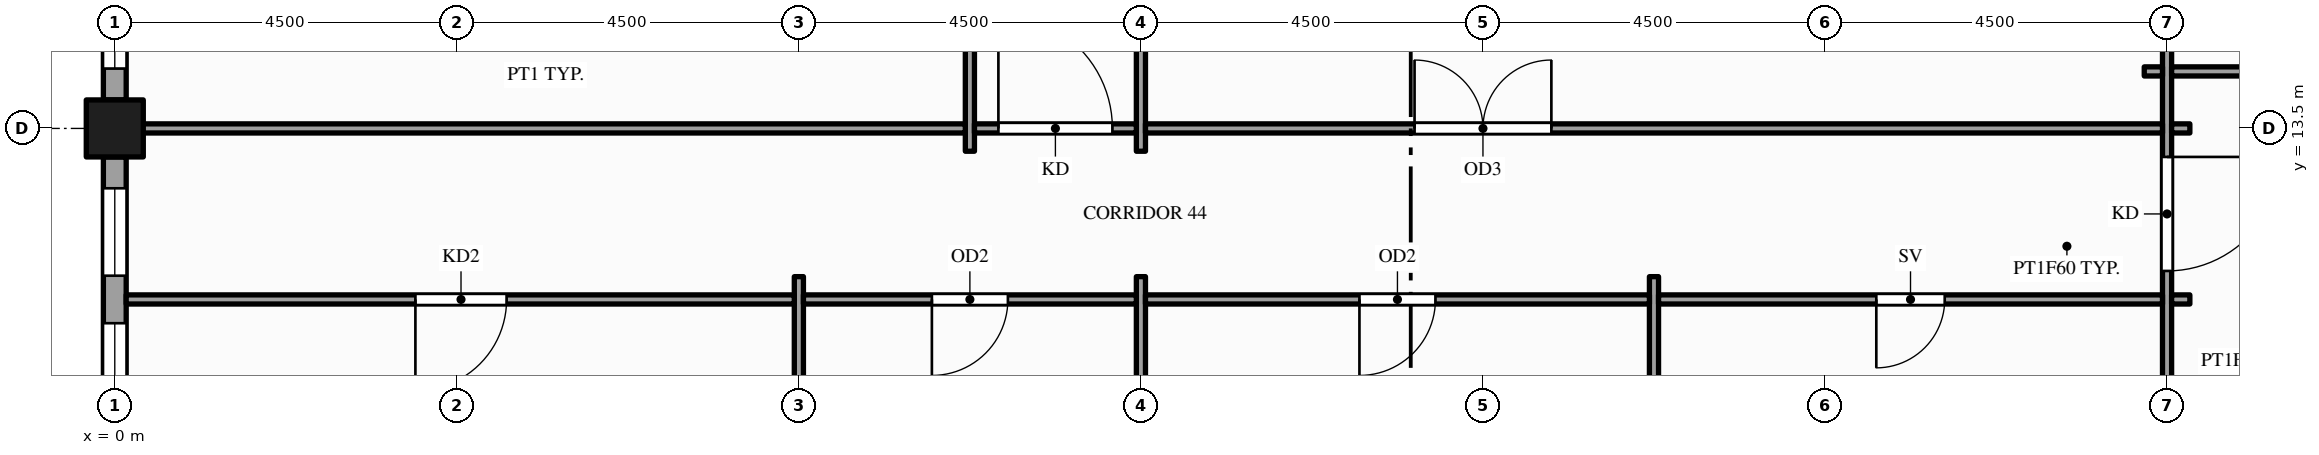
"""IFC4 building model, lengths in metres.
Left out: names, types, materials, properties, quantities, classifications, styles, units other than length and angle.
Written with IfcOpenShell. Run it as: python <this file> out.ifc"""

import sys

from ifc_helpers import new_model, si_unit, direction, frame, frame_2d, origin, origin_2d, place, context, subcontext, project, spatial, rectangle, hollow_rectangle, extrude, element, fill, save


model = new_model("IFC4")
c1 = context("Model", 3, precision=1e-05, world=origin(), true_north=direction((0.0, 1.0)))
c2 = subcontext(c1, "Body", "Model", "MODEL_VIEW")
j1 = project(units=[si_unit("LENGTHUNIT", "METRE"), si_unit("PLANEANGLEUNIT", "RADIAN")], contexts=[c1])
p1 = place(None, origin())
s1 = spatial("IfcSite", under=j1, at=p1, CompositionType="ELEMENT")
p2 = place(p1, origin())
s2 = spatial("IfcBuilding", under=s1, at=p2, CompositionType="ELEMENT")
p3 = place(p2, frame((0.0, 0.0, 207.0)))
s3 = spatial("IfcBuildingStorey", under=s2, at=p3, CompositionType="ELEMENT", Elevation=207.0)
p4 = place(p3, frame((0.0, 13.5, -0.15), z_axis=(0.0, 0.0, 1.0), x_axis=(1.0, 0.0, 0.0)))
e1 = element("IfcColumn", 1, at=p4, inside=s3, PredefinedType="COLUMN", context=c2, shape_type="SweptSolid", body=[
    extrude(hollow_rectangle(XDim=0.75, YDim=0.75, WallThickness=0.036, at=origin_2d()), origin(), (0.0, 0.0, 1.0), 4.0),
])
p5 = place(p3, frame((0.0, 17.625, 0.0), z_axis=(0.0, 0.0, 1.0), x_axis=(0.0, -1.0, 0.0)))
e2 = element("IfcWall", 2, at=p5, inside=s3, PredefinedType="STANDARD", context=c2, shape_type="SweptSolid", body=[
    extrude(rectangle(XDim=3.75, YDim=0.3, at=frame_2d((1.875, 0.0))), origin(), (0.0, 0.0, 1.0), 3.157),
])
p6 = place(p5, frame((0.413, 0.0, 0.9)))
e3 = element("IfcOpeningElement", 3, at=p6, cuts=e2, PredefinedType="OPENING", context=c2, shape_type="SweptSolid", body=[
    extrude(rectangle(XDim=1.15, YDim=2.0, at=frame_2d((0.575, 1.0))), frame((0.0, 0.16, 0.0), z_axis=(0.0, -1.0, 0.0), x_axis=(1.0, 0.0, 0.0)), (0.0, 0.0, 1.0), 0.32),
])
p7 = place(p5, frame((2.188, 0.0, 0.9)))
e4 = element("IfcOpeningElement", 4, at=p7, cuts=e2, PredefinedType="OPENING", context=c2, shape_type="SweptSolid", body=[
    extrude(rectangle(XDim=1.15, YDim=2.0, at=frame_2d((0.575, 1.0))), frame((0.0, 0.16, 0.0), z_axis=(0.0, -1.0, 0.0), x_axis=(1.0, 0.0, 0.0)), (0.0, 0.0, 1.0), 0.32),
])
p8 = place(p3, frame((0.0, 13.125, 0.0), z_axis=(0.0, 0.0, 1.0), x_axis=(0.0, -1.0, 0.0)))
e5 = element("IfcWall", 5, at=p8, inside=s3, PredefinedType="STANDARD", context=c2, shape_type="SweptSolid", body=[
    extrude(rectangle(XDim=3.75, YDim=0.3, at=frame_2d((1.875, 0.0))), origin(), (0.0, 0.0, 1.0), 3.157),
])
p9 = place(p8, frame((0.413, 0.0, 0.9)))
e6 = element("IfcOpeningElement", 6, at=p9, cuts=e5, PredefinedType="OPENING", context=c2, shape_type="SweptSolid", body=[
    extrude(rectangle(XDim=1.15, YDim=2.0, at=frame_2d((0.575, 1.0))), frame((0.0, 0.16, 0.0), z_axis=(0.0, -1.0, 0.0), x_axis=(1.0, 0.0, 0.0)), (0.0, 0.0, 1.0), 0.32),
])
p10 = place(p8, frame((2.188, 0.0, 0.9)))
e7 = element("IfcOpeningElement", 7, at=p10, cuts=e5, PredefinedType="OPENING", context=c2, shape_type="SweptSolid", body=[
    extrude(rectangle(XDim=1.15, YDim=2.0, at=frame_2d((0.575, 1.0))), frame((0.0, 0.16, 0.0), z_axis=(0.0, -1.0, 0.0), x_axis=(1.0, 0.0, 0.0)), (0.0, 0.0, 1.0), 0.32),
])
p11 = place(p3, frame((9.0, 3.875, 0.0), z_axis=(0.0, 0.0, 1.0), x_axis=(0.0, 1.0, 0.0)))
e8 = element("IfcWall", 8, at=p11, inside=s3, PredefinedType="PARTITIONING", context=c2, shape_type="SweptSolid", body=[
    extrude(rectangle(XDim=7.675, YDim=0.12, at=frame_2d((3.837, 0.0))), origin(), (0.0, 0.0, 1.0), 2.87),
])
p12 = place(p3, frame((11.25, 13.2, 0.0), z_axis=(0.0, 0.0, 1.0), x_axis=(0.0, 1.0, 0.0)))
e9 = element("IfcWall", 9, at=p12, inside=s3, PredefinedType="PARTITIONING", context=c2, shape_type="SweptSolid", body=[
    extrude(rectangle(XDim=18.6, YDim=0.12, at=frame_2d((9.3, 0.0))), origin(), (0.0, 0.0, 1.0), 2.6),
])
p13 = place(p12, frame((3.175, 0.0, 0.0)))
e10 = element("IfcOpeningElement", 10, at=p13, cuts=e9, PredefinedType="OPENING", context=c2, shape_type="SweptSolid", body=[
    extrude(rectangle(XDim=1.0, YDim=2.1, at=frame_2d((0.5, 1.05))), frame((0.0, 0.07, 0.0), z_axis=(0.0, -1.0, 0.0), x_axis=(1.0, 0.0, 0.0)), (0.0, 0.0, 1.0), 0.14),
])
p14 = place(p12, frame((9.955, 0.0, 0.0)))
e11 = element("IfcOpeningElement", 11, at=p14, cuts=e9, PredefinedType="OPENING", context=c2, shape_type="SweptSolid", body=[
    extrude(rectangle(XDim=1.0, YDim=2.1, at=frame_2d((0.5, 1.05))), frame((0.0, 0.07, 0.0), z_axis=(0.0, -1.0, 0.0), x_axis=(1.0, 0.0, 0.0)), (0.0, 0.0, 1.0), 0.14),
])
p15 = place(p3, frame((13.5, 0.15, 0.0), z_axis=(0.0, 0.0, 1.0), x_axis=(0.0, 1.0, 0.0)))
e12 = element("IfcWall", 12, at=p15, inside=s3, PredefinedType="PARTITIONING", context=c2, shape_type="SweptSolid", body=[
    extrude(rectangle(XDim=11.4, YDim=0.12, at=frame_2d((5.7, 0.0))), origin(), (0.0, 0.0, 1.0), 2.87),
])
p16 = place(p3, frame((13.5, 13.2, 0.0), z_axis=(0.0, 0.0, 1.0), x_axis=(0.0, 1.0, 0.0)))
e13 = element("IfcWall", 13, at=p16, inside=s3, PredefinedType="PARTITIONING", context=c2, shape_type="SweptSolid", body=[
    extrude(rectangle(XDim=18.6, YDim=0.12, at=frame_2d((9.3, 0.0))), origin(), (0.0, 0.0, 1.0), 2.6),
])
p17 = place(p16, frame((4.2, 0.0, 0.0)))
e14 = element("IfcOpeningElement", 14, at=p17, cuts=e13, PredefinedType="OPENING", context=c2, shape_type="SweptSolid", body=[
    extrude(rectangle(XDim=1.2, YDim=2.1, at=frame_2d((0.6, 1.05))), frame((0.0, 0.07, 0.0), z_axis=(0.0, -1.0, 0.0), x_axis=(1.0, 0.0, 0.0)), (0.0, 0.0, 1.0), 0.14),
])
p18 = place(p3, frame((20.25, 0.15, 0.0), z_axis=(0.0, 0.0, 1.0), x_axis=(0.0, 1.0, 0.0)))
e15 = element("IfcWall", 15, at=p18, inside=s3, PredefinedType="PARTITIONING", context=c2, shape_type="SweptSolid", body=[
    extrude(rectangle(XDim=11.4, YDim=0.12, at=frame_2d((5.7, 0.0))), origin(), (0.0, 0.0, 1.0), 2.87),
])
p19 = place(p3, frame((27.0, -1.35, 0.0), z_axis=(0.0, 0.0, 1.0), x_axis=(0.0, 1.0, 0.0)))
e16 = element("IfcWall", 16, at=p19, inside=s3, PredefinedType="PARTITIONING", context=c2, shape_type="SweptSolid", body=[
    extrude(rectangle(XDim=22.48, YDim=0.12, at=frame_2d((11.24, 0.0))), origin(), (0.0, 0.0, 1.0), 2.87),
])
p20 = place(p19, frame((12.975, 0.0, 0.0)))
e17 = element("IfcOpeningElement", 17, at=p20, cuts=e16, PredefinedType="OPENING", context=c2, shape_type="SweptSolid", body=[
    extrude(rectangle(XDim=1.5, YDim=2.1, at=frame_2d((0.75, 1.05))), frame((0.0, 0.07, 0.0), z_axis=(0.0, -1.0, 0.0), x_axis=(1.0, 0.0, 0.0)), (0.0, 0.0, 1.0), 0.14),
])
p21 = place(p3, frame((0.15, 11.25, 0.0), z_axis=(0.0, 0.0, 1.0), x_axis=(1.0, 0.0, 0.0)))
e18 = element("IfcWall", 18, at=p21, inside=s3, PredefinedType="PARTITIONING", context=c2, shape_type="SweptSolid", body=[
    extrude(rectangle(XDim=8.79, YDim=0.12, at=frame_2d((4.395, 0.0))), origin(), (0.0, 0.0, 1.0), 2.87),
])
p22 = place(p21, frame((3.805, 0.0, 0.0)))
e19 = element("IfcOpeningElement", 19, at=p22, cuts=e18, PredefinedType="OPENING", context=c2, shape_type="SweptSolid", body=[
    extrude(rectangle(XDim=1.2, YDim=2.1, at=frame_2d((0.6, 1.05))), frame((0.0, 0.07, 0.0), z_axis=(0.0, -1.0, 0.0), x_axis=(1.0, 0.0, 0.0)), (0.0, 0.0, 1.0), 0.14),
])
p23 = place(p3, frame((9.06, 11.25, 0.0), z_axis=(0.0, 0.0, 1.0), x_axis=(1.0, 0.0, 0.0)))
e20 = element("IfcWall", 20, at=p23, inside=s3, PredefinedType="PARTITIONING", context=c2, shape_type="SweptSolid", body=[
    extrude(rectangle(XDim=4.38, YDim=0.12, at=frame_2d((2.19, 0.0))), origin(), (0.0, 0.0, 1.0), 2.87),
])
p24 = place(p23, frame((1.69, 0.0, 0.0)))
e21 = element("IfcOpeningElement", 21, at=p24, cuts=e20, PredefinedType="OPENING", context=c2, shape_type="SweptSolid", body=[
    extrude(rectangle(XDim=1.0, YDim=2.1, at=frame_2d((0.5, 1.05))), frame((0.0, 0.07, 0.0), z_axis=(0.0, -1.0, 0.0), x_axis=(1.0, 0.0, 0.0)), (0.0, 0.0, 1.0), 0.14),
])
p25 = place(p3, frame((13.56, 11.25, 0.0), z_axis=(0.0, 0.0, 1.0), x_axis=(1.0, 0.0, 0.0)))
e22 = element("IfcWall", 22, at=p25, inside=s3, PredefinedType="PARTITIONING", context=c2, shape_type="SweptSolid", body=[
    extrude(rectangle(XDim=6.63, YDim=0.12, at=frame_2d((3.315, 0.0))), origin(), (0.0, 0.0, 1.0), 2.87),
])
p26 = place(p25, frame((2.815, 0.0, 0.0)))
e23 = element("IfcOpeningElement", 23, at=p26, cuts=e22, PredefinedType="OPENING", context=c2, shape_type="SweptSolid", body=[
    extrude(rectangle(XDim=1.0, YDim=2.1, at=frame_2d((0.5, 1.05))), frame((0.0, 0.07, 0.0), z_axis=(0.0, -1.0, 0.0), x_axis=(1.0, 0.0, 0.0)), (0.0, 0.0, 1.0), 0.14),
])
p27 = place(p3, frame((20.31, 11.25, 0.0), z_axis=(0.0, 0.0, 1.0), x_axis=(1.0, 0.0, 0.0)))
e24 = element("IfcWall", 24, at=p27, inside=s3, PredefinedType="PARTITIONING", context=c2, shape_type="SweptSolid", body=[
    extrude(rectangle(XDim=6.63, YDim=0.12, at=frame_2d((3.315, 0.0))), origin(), (0.0, 0.0, 1.0), 2.76),
])
p28 = place(p27, frame((2.865, 0.0, 0.0)))
e25 = element("IfcOpeningElement", 25, at=p28, cuts=e24, PredefinedType="OPENING", context=c2, shape_type="SweptSolid", body=[
    extrude(rectangle(XDim=0.9, YDim=2.1, at=frame_2d((0.45, 1.05))), frame((0.0, 0.07, 0.0), z_axis=(0.0, -1.0, 0.0), x_axis=(1.0, 0.0, 0.0)), (0.0, 0.0, 1.0), 0.14),
])
p29 = place(p3, frame((27.06, 11.25, 0.0), z_axis=(0.0, 0.0, 1.0), x_axis=(1.0, 0.0, 0.0)))
e26 = element("IfcWall", 26, at=p29, inside=s3, PredefinedType="PARTITIONING", context=c2, shape_type="SweptSolid", body=[
    extrude(rectangle(XDim=0.24, YDim=0.12, at=frame_2d((0.12, 0.0))), origin(), (0.0, 0.0, 1.0), 2.87),
])
p30 = place(p3, frame((0.15, 13.5, 0.0), z_axis=(0.0, 0.0, 1.0), x_axis=(1.0, 0.0, 0.0)))
e27 = element("IfcWall", 27, at=p30, inside=s3, PredefinedType="PARTITIONING", context=c2, shape_type="SweptSolid", body=[
    extrude(rectangle(XDim=11.04, YDim=0.12, at=frame_2d((5.52, 0.0))), origin(), (0.0, 0.0, 1.0), 2.87),
])
p31 = place(p3, frame((11.31, 13.5, 0.0), z_axis=(0.0, 0.0, 1.0), x_axis=(1.0, 0.0, 0.0)))
e28 = element("IfcWall", 28, at=p31, inside=s3, PredefinedType="PARTITIONING", context=c2, shape_type="SweptSolid", body=[
    extrude(rectangle(XDim=2.13, YDim=0.12, at=frame_2d((1.065, 0.0))), origin(), (0.0, 0.0, 1.0), 2.87),
])
p32 = place(p31, frame((0.315, 0.0, 0.0)))
e29 = element("IfcOpeningElement", 29, at=p32, cuts=e28, PredefinedType="OPENING", context=c2, shape_type="SweptSolid", body=[
    extrude(rectangle(XDim=1.5, YDim=2.1, at=frame_2d((0.75, 1.05))), frame((0.0, 0.07, 0.0), z_axis=(0.0, -1.0, 0.0), x_axis=(1.0, 0.0, 0.0)), (0.0, 0.0, 1.0), 0.14),
])
p33 = place(p3, frame((13.56, 13.5, 0.0), z_axis=(0.0, 0.0, 1.0), x_axis=(1.0, 0.0, 0.0)))
e30 = element("IfcWall", 30, at=p33, inside=s3, PredefinedType="PARTITIONING", context=c2, shape_type="SweptSolid", body=[
    extrude(rectangle(XDim=13.38, YDim=0.12, at=frame_2d((6.69, 0.0))), origin(), (0.0, 0.0, 1.0), 2.76),
])
p34 = place(p33, frame((3.54, 0.0, 0.0)))
e31 = element("IfcOpeningElement", 31, at=p34, cuts=e30, PredefinedType="OPENING", context=c2, shape_type="SweptSolid", body=[
    extrude(rectangle(XDim=1.8, YDim=2.1, at=frame_2d((0.9, 1.05))), frame((0.0, 0.07, 0.0), z_axis=(0.0, -1.0, 0.0), x_axis=(1.0, 0.0, 0.0)), (0.0, 0.0, 1.0), 0.14),
])
for number, where, z_axis, x_axis in (
    (32, (27.06, 13.5, 0.0), (0.0, 0.0, 1.0), (1.0, 0.0, 0.0)),
    (33, (26.7, 14.25, 0.0), (0.0, 0.0, 1.0), (1.0, 0.0, 0.0)),
):
    element("IfcWall", number, at=place(p3, frame(where, z_axis=z_axis, x_axis=x_axis)), inside=s3, PredefinedType="PARTITIONING", context=c2, shape_type="SweptSolid", body=[
        extrude(rectangle(XDim=0.24, YDim=0.12, at=frame_2d((0.12, 0.0))), origin(), (0.0, 0.0, 1.0), 2.87),
    ])
p35 = place(p3, frame((27.06, 14.25, 0.0), z_axis=(0.0, 0.0, 1.0), x_axis=(1.0, 0.0, 0.0)))
e34 = element("IfcWall", 34, at=p35, inside=s3, PredefinedType="PARTITIONING", context=c2, shape_type="SweptSolid", body=[
    extrude(rectangle(XDim=2.13, YDim=0.12, at=frame_2d((1.065, 0.0))), origin(), (0.0, 0.0, 1.0), 2.87),
])
p36 = place(p7, origin())
e35 = element("IfcWindow", 35, at=p36, inside=s3, PartitioningType="SINGLE_PANEL", PredefinedType="WINDOW", context=c2, shape_type="SweptSolid", body=[
    extrude(rectangle(XDim=1.15, YDim=2.0, at=frame_2d((0.575, 1.0))), frame((0.0, 0.03, 0.0), z_axis=(0.0, -1.0, 0.0), x_axis=(1.0, 0.0, 0.0)), (0.0, 0.0, 1.0), 0.06),
])
fill(e4, e35)
p37 = place(p9, origin())
e36 = element("IfcWindow", 36, at=p37, inside=s3, PartitioningType="SINGLE_PANEL", PredefinedType="WINDOW", context=c2, shape_type="SweptSolid", body=[
    extrude(rectangle(XDim=1.15, YDim=2.0, at=frame_2d((0.575, 1.0))), frame((0.0, 0.03, 0.0), z_axis=(0.0, -1.0, 0.0), x_axis=(1.0, 0.0, 0.0)), (0.0, 0.0, 1.0), 0.06),
])
fill(e6, e36)
p38 = place(p10, origin())
e37 = element("IfcWindow", 37, at=p38, inside=s3, PartitioningType="SINGLE_PANEL", PredefinedType="WINDOW", context=c2, shape_type="SweptSolid", body=[
    extrude(rectangle(XDim=1.15, YDim=2.0, at=frame_2d((0.575, 1.0))), frame((0.0, 0.03, 0.0), z_axis=(0.0, -1.0, 0.0), x_axis=(1.0, 0.0, 0.0)), (0.0, 0.0, 1.0), 0.06),
])
fill(e7, e37)
p39 = place(p20, origin())
e38 = element("IfcDoor", 38, at=p39, inside=s3, OperationType="SINGLE_SWING_RIGHT", PredefinedType="DOOR", context=c2, shape_type="SweptSolid", body=[
    extrude(rectangle(XDim=1.5, YDim=2.1, at=frame_2d((0.75, 1.05))), frame((0.0, 0.025, 0.0), z_axis=(0.0, -1.0, 0.0), x_axis=(1.0, 0.0, 0.0)), (0.0, 0.0, 1.0), 0.05),
])
fill(e17, e38)
p40 = place(p22, origin())
e39 = element("IfcDoor", 39, at=p40, inside=s3, OperationType="SINGLE_SWING_LEFT", PredefinedType="DOOR", context=c2, shape_type="SweptSolid", body=[
    extrude(rectangle(XDim=1.2, YDim=2.1, at=frame_2d((0.6, 1.05))), frame((0.0, 0.025, 0.0), z_axis=(0.0, -1.0, 0.0), x_axis=(1.0, 0.0, 0.0)), (0.0, 0.0, 1.0), 0.05),
])
fill(e19, e39)
p41 = place(p24, origin())
e40 = element("IfcDoor", 40, at=p41, inside=s3, OperationType="SINGLE_SWING_LEFT", PredefinedType="DOOR", context=c2, shape_type="SweptSolid", body=[
    extrude(rectangle(XDim=1.0, YDim=2.1, at=frame_2d((0.5, 1.05))), frame((0.0, 0.025, 0.0), z_axis=(0.0, -1.0, 0.0), x_axis=(1.0, 0.0, 0.0)), (0.0, 0.0, 1.0), 0.05),
])
fill(e21, e40)
p42 = place(p26, origin())
e41 = element("IfcDoor", 41, at=p42, inside=s3, OperationType="SINGLE_SWING_LEFT", PredefinedType="DOOR", context=c2, shape_type="SweptSolid", body=[
    extrude(rectangle(XDim=1.0, YDim=2.1, at=frame_2d((0.5, 1.05))), frame((0.0, 0.025, 0.0), z_axis=(0.0, -1.0, 0.0), x_axis=(1.0, 0.0, 0.0)), (0.0, 0.0, 1.0), 0.05),
])
fill(e23, e41)
p43 = place(p28, origin())
e42 = element("IfcDoor", 42, at=p43, inside=s3, OperationType="SINGLE_SWING_LEFT", PredefinedType="DOOR", context=c2, shape_type="SweptSolid", body=[
    extrude(rectangle(XDim=0.9, YDim=2.1, at=frame_2d((0.45, 1.05))), frame((0.0, 0.025, 0.0), z_axis=(0.0, -1.0, 0.0), x_axis=(1.0, 0.0, 0.0)), (0.0, 0.0, 1.0), 0.05),
])
fill(e25, e42)
p44 = place(p34, origin())
e43 = element("IfcDoor", 43, at=p44, inside=s3, OperationType="DOUBLE_DOOR_SINGLE_SWING", PredefinedType="DOOR", context=c2, shape_type="SweptSolid", body=[
    extrude(rectangle(XDim=1.8, YDim=2.1, at=frame_2d((0.9, 1.05))), frame((0.0, 0.025, 0.0), z_axis=(0.0, -1.0, 0.0), x_axis=(1.0, 0.0, 0.0)), (0.0, 0.0, 1.0), 0.05),
])
fill(e31, e43)
p45 = place(p32, origin())
e44 = element("IfcDoor", 44, at=p45, inside=s3, OperationType="SINGLE_SWING_LEFT", PredefinedType="DOOR", context=c2, shape_type="SweptSolid", body=[
    extrude(rectangle(XDim=1.5, YDim=2.1, at=frame_2d((0.75, 1.05))), frame((0.0, 0.025, 0.0), z_axis=(0.0, -1.0, 0.0), x_axis=(1.0, 0.0, 0.0)), (0.0, 0.0, 1.0), 0.05),
])
fill(e29, e44)
save(model, sys.argv[1])
